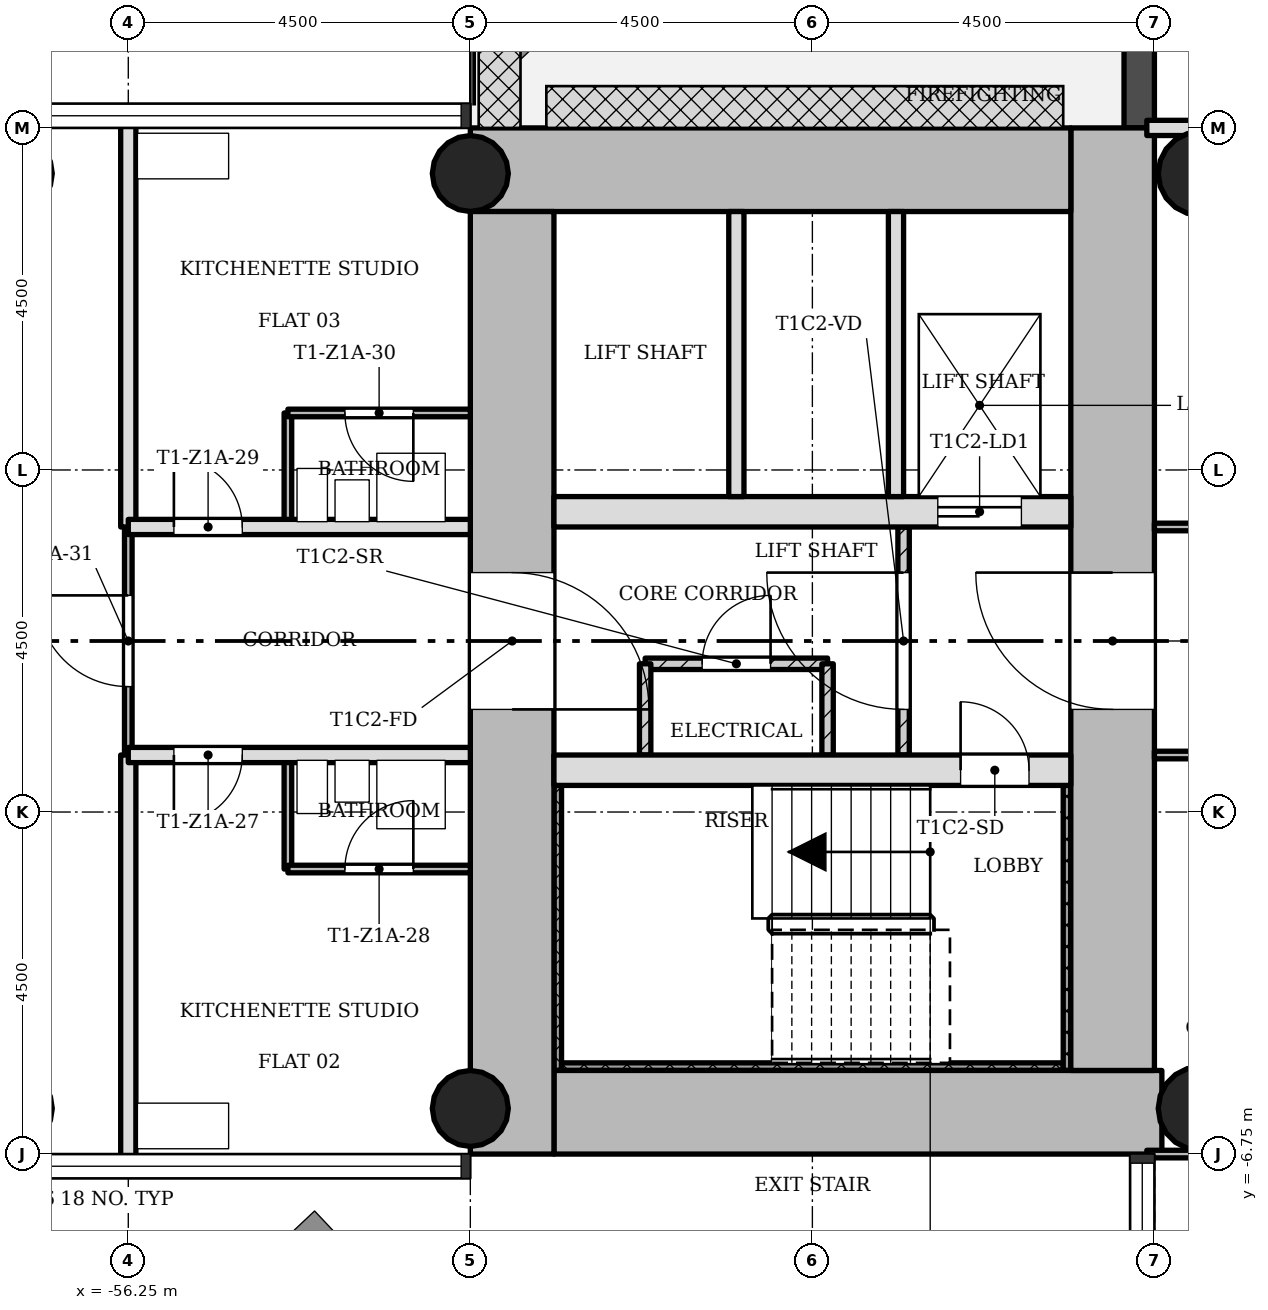
"""IFC4 building model, lengths in metres.
Left out: names, types, materials, properties, quantities, classifications, styles, units other than length and angle.
Written with IfcOpenShell. Run it as: python <this file> out.ifc"""

import sys

from ifc_helpers import new_model, si_unit, direction, frame, frame_2d, origin, origin_2d, place, context, subcontext, project, spatial, rectangle, hollow_circle, extrude, element, fill, save


model = new_model("IFC4")
c1 = context("Model", 3, precision=1e-05, world=origin(), true_north=direction((0.0, 1.0)))
c2 = subcontext(c1, "Body", "Model", "MODEL_VIEW")
j1 = project(units=[si_unit("LENGTHUNIT", "METRE"), si_unit("PLANEANGLEUNIT", "RADIAN")], contexts=[c1])
p1 = place(None, origin())
s1 = spatial("IfcSite", under=j1, at=p1, CompositionType="ELEMENT")
p2 = place(p1, origin())
s2 = spatial("IfcBuilding", under=s1, at=p2, CompositionType="ELEMENT")
p3 = place(p2, frame((0.0, 0.0, 31.3)))
s3 = spatial("IfcBuildingStorey", under=s2, at=p3, CompositionType="ELEMENT", Elevation=31.3)
p4 = place(p3, frame((-50.65, -6.2, 0.0), z_axis=(0.0, 0.0, 1.0), x_axis=(1.0, 0.0, 0.0)))
e1 = element("IfcWall", 1, at=p4, inside=s3, PredefinedType="SHEAR", context=c2, shape_type="SweptSolid", body=[
    extrude(rectangle(XDim=7.998, YDim=1.1, at=frame_2d((3.999, 0.0))), origin(), (0.0, 0.0, 1.0), 3.4),
])
p5 = place(p3, frame((-43.3, -5.65, 0.0), z_axis=(0.0, 0.0, 1.0), x_axis=(0.0, 1.0, 0.0)))
e2 = element("IfcWall", 2, at=p5, inside=s3, PredefinedType="SHEAR", context=c2, shape_type="SweptSolid", body=[
    extrude(rectangle(XDim=12.4, YDim=1.1, at=frame_2d((6.2, 0.0))), origin(), (0.0, 0.0, 1.0), 3.4),
])
p6 = place(p5, frame((4.75, 0.0, 0.0)))
e3 = element("IfcOpeningElement", 3, at=p6, cuts=e2, PredefinedType="OPENING", context=c2, shape_type="SweptSolid", body=[
    extrude(rectangle(XDim=1.8, YDim=2.1, at=frame_2d((0.9, 1.05))), frame((0.0, 0.56, 0.0), z_axis=(0.0, -1.0, 0.0), x_axis=(1.0, 0.0, 0.0)), (0.0, 0.0, 1.0), 1.12),
])
p7 = place(p3, frame((-43.85, 6.2, 0.0), z_axis=(0.0, 0.0, 1.0), x_axis=(-1.0, 0.0, 0.0)))
e4 = element("IfcWall", 4, at=p7, inside=s3, PredefinedType="SHEAR", context=c2, shape_type="SweptSolid", body=[
    extrude(rectangle(XDim=7.9, YDim=1.1, at=frame_2d((3.95, 0.0))), origin(), (0.0, 0.0, 1.0), 3.4),
])
p8 = place(p3, frame((-51.2, 5.65, 0.0), z_axis=(0.0, 0.0, 1.0), x_axis=(0.0, -1.0, 0.0)))
e5 = element("IfcWall", 5, at=p8, inside=s3, PredefinedType="SHEAR", context=c2, shape_type="SweptSolid", body=[
    extrude(rectangle(XDim=12.4, YDim=1.1, at=frame_2d((6.2, 0.0))), origin(), (0.0, 0.0, 1.0), 3.4),
])
p9 = place(p8, frame((4.75, 0.0, 0.0)))
e6 = element("IfcOpeningElement", 6, at=p9, cuts=e5, PredefinedType="OPENING", context=c2, shape_type="SweptSolid", body=[
    extrude(rectangle(XDim=1.8, YDim=2.1, at=frame_2d((0.9, 1.05))), frame((0.0, 0.56, 0.0), z_axis=(0.0, -1.0, 0.0), x_axis=(1.0, 0.0, 0.0)), (0.0, 0.0, 1.0), 1.12),
])
p10 = place(p3, frame((-50.65, -1.7, 0.0), z_axis=(0.0, 0.0, 1.0), x_axis=(1.0, 0.0, 0.0)))
e7 = element("IfcWall", 7, at=p10, inside=s3, PredefinedType="SHEAR", context=c2, shape_type="SweptSolid", body=[
    extrude(rectangle(XDim=6.8, YDim=0.4, at=frame_2d((3.4, 0.0))), origin(), (0.0, 0.0, 1.0), 3.4),
])
p11 = place(p10, frame((5.35, 0.0, 0.0)))
e8 = element("IfcOpeningElement", 8, at=p11, cuts=e7, PredefinedType="OPENING", context=c2, shape_type="SweptSolid", body=[
    extrude(rectangle(XDim=0.9, YDim=2.1, at=frame_2d((0.45, 1.05))), frame((0.0, 0.21, 0.0), z_axis=(0.0, -1.0, 0.0), x_axis=(1.0, 0.0, 0.0)), (0.0, 0.0, 1.0), 0.42),
])
p12 = place(p3, frame((-50.65, 1.7, 0.0), z_axis=(0.0, 0.0, 1.0), x_axis=(1.0, 0.0, 0.0)))
e9 = element("IfcWall", 9, at=p12, inside=s3, PredefinedType="SHEAR", context=c2, shape_type="SweptSolid", body=[
    extrude(rectangle(XDim=6.8, YDim=0.4, at=frame_2d((3.4, 0.0))), origin(), (0.0, 0.0, 1.0), 3.4),
])
p13 = place(p12, frame((5.05, 0.0, 0.0)))
e10 = element("IfcOpeningElement", 10, at=p13, cuts=e9, PredefinedType="OPENING", context=c2, shape_type="SweptSolid", body=[
    extrude(rectangle(XDim=1.1, YDim=2.1, at=frame_2d((0.55, 1.05))), frame((0.0, 0.21, 0.0), z_axis=(0.0, -1.0, 0.0), x_axis=(1.0, 0.0, 0.0)), (0.0, 0.0, 1.0), 0.42),
])
for number, where, z_axis, x_axis in (
    (11, (-51.75, -6.15, 0.0), (0.0, 0.0, 1.0), (1.0, 0.0, 0.0)),
    (12, (-51.75, 6.15, 0.0), (0.0, 0.0, 1.0), (1.0, 0.0, 0.0)),
):
    element("IfcColumn", number, at=place(p3, frame(where, z_axis=z_axis, x_axis=x_axis)), inside=s3, PredefinedType="COLUMN", context=c2, shape_type="SweptSolid", body=[
        extrude(hollow_circle(Radius=0.5, WallThickness=0.036, at=origin_2d()), origin(), (0.0, 0.0, 1.0), 3.4),
    ])
for number, where, z_axis, x_axis in (
    (13, (-42.15, -6.15, 0.0), (0.0, 0.0, 1.0), (1.0, 0.0, 0.0)),
    (14, (-42.15, 6.15, 0.0), (0.0, 0.0, 1.0), (1.0, 0.0, 0.0)),
):
    element("IfcColumn", number, at=place(p3, frame(where, z_axis=z_axis, x_axis=x_axis)), inside=s3, PredefinedType="COLUMN", context=c2, shape_type="SweptSolid", body=[
        extrude(hollow_circle(Radius=0.55, WallThickness=0.04, at=origin_2d()), origin(), (0.0, 0.0, 1.0), 3.4),
    ])
p14 = place(p3, frame((-42.95, 11.25, -0.02), z_axis=(0.0, 0.0, 1.0), x_axis=(0.0, -1.0, 0.0)))
e15 = element("IfcWall", 15, at=p14, inside=s3, PredefinedType="STANDARD", context=c2, shape_type="SweptSolid", body=[
    extrude(rectangle(XDim=4.5, YDim=0.4, at=frame_2d((2.25, 0.0))), origin(), (0.0, 0.0, 1.0), 3.12),
])
p15 = place(p14, frame((1.35, 0.0, 0.02)))
e16 = element("IfcOpeningElement", 16, at=p15, cuts=e15, PredefinedType="OPENING", context=c2, shape_type="SweptSolid", body=[
    extrude(rectangle(XDim=1.8, YDim=2.1, at=frame_2d((0.9, 1.05))), frame((0.0, 0.21, 0.0), z_axis=(0.0, -1.0, 0.0), x_axis=(1.0, 0.0, 0.0)), (0.0, 0.0, 1.0), 0.42),
])
p16 = place(p3, frame((-46.05, 1.5, 0.0), z_axis=(0.0, 0.0, 1.0), x_axis=(0.0, -1.0, 0.0)))
e17 = element("IfcWall", 17, at=p16, inside=s3, PredefinedType="PARTITIONING", context=c2, shape_type="SweptSolid", body=[
    extrude(rectangle(XDim=3.0, YDim=0.15, at=frame_2d((1.5, 0.0))), origin(), (0.0, 0.0, 1.0), 3.0),
])
p17 = place(p16, frame((0.6, 0.0, 0.0)))
e18 = element("IfcOpeningElement", 18, at=p17, cuts=e17, PredefinedType="OPENING", context=c2, shape_type="SweptSolid", body=[
    extrude(rectangle(XDim=1.8, YDim=2.1, at=frame_2d((0.9, 1.05))), frame((0.0, 0.085, 0.0), z_axis=(0.0, -1.0, 0.0), x_axis=(1.0, 0.0, 0.0)), (0.0, 0.0, 1.0), 0.17),
])
for number, where, z_axis, x_axis in (
    (19, (-46.15, 5.65, 0.0), (0.0, 0.0, 1.0), (0.0, -1.0, 0.0)),
    (20, (-48.25, 5.65, 0.0), (0.0, 0.0, 1.0), (0.0, -1.0, 0.0)),
):
    element("IfcWall", number, at=place(p3, frame(where, z_axis=z_axis, x_axis=x_axis)), inside=s3, PredefinedType="SOLIDWALL", context=c2, shape_type="SweptSolid", body=[
        extrude(rectangle(XDim=3.75, YDim=0.2, at=frame_2d((1.875, 0.0))), origin(), (0.0, 0.0, 1.0), 3.0),
    ])
p18 = place(p3, frame((-47.05, -0.3, 0.0), z_axis=(0.0, 0.0, 1.0), x_axis=(-1.0, 0.0, 0.0)))
e21 = element("IfcWall", 21, at=p18, inside=s3, PredefinedType="PARTITIONING", context=c2, shape_type="SweptSolid", body=[
    extrude(rectangle(XDim=2.4, YDim=0.15, at=frame_2d((1.2, 0.0))), origin(), (0.0, 0.0, 1.0), 3.0),
])
p19 = place(p18, frame((0.75, 0.0, 0.0)))
e22 = element("IfcOpeningElement", 22, at=p19, cuts=e21, PredefinedType="OPENING", context=c2, shape_type="SweptSolid", body=[
    extrude(rectangle(XDim=0.9, YDim=2.1, at=frame_2d((0.45, 1.05))), frame((0.0, 0.085, 0.0), z_axis=(0.0, -1.0, 0.0), x_axis=(1.0, 0.0, 0.0)), (0.0, 0.0, 1.0), 0.17),
])
for number, where, z_axis, x_axis in (
    (23, (-47.05, -0.3, 0.0), (0.0, 0.0, 1.0), (0.0, -1.0, 0.0)),
    (24, (-49.45, -0.3, 0.0), (0.0, 0.0, 1.0), (0.0, -1.0, 0.0)),
):
    element("IfcWall", number, at=place(p3, frame(where, z_axis=z_axis, x_axis=x_axis)), inside=s3, PredefinedType="PARTITIONING", context=c2, shape_type="SweptSolid", body=[
        extrude(rectangle(XDim=1.2, YDim=0.15, at=frame_2d((0.6, 0.0))), origin(), (0.0, 0.0, 1.0), 3.0),
    ])
p20 = place(p3, frame((-56.25, -1.5, 0.0), z_axis=(0.0, 0.0, 1.0), x_axis=(0.0, 1.0, 0.0)))
e25 = element("IfcWall", 25, at=p20, inside=s3, PredefinedType="PARTITIONING", context=c2, shape_type="SweptSolid", body=[
    extrude(rectangle(XDim=3.0, YDim=0.1, at=frame_2d((1.5, 0.0))), origin(), (0.0, 0.0, 1.0), 3.0),
])
p21 = place(p20, frame((0.9, 0.0, 0.0)))
e26 = element("IfcOpeningElement", 26, at=p21, cuts=e25, PredefinedType="OPENING", context=c2, shape_type="SweptSolid", body=[
    extrude(rectangle(XDim=1.2, YDim=2.1, at=frame_2d((0.6, 1.05))), frame((0.0, 0.06, 0.0), z_axis=(0.0, -1.0, 0.0), x_axis=(1.0, 0.0, 0.0)), (0.0, 0.0, 1.0), 0.12),
])
for number, where, z_axis, x_axis in (
    (27, (-56.25, -6.85, 0.0), (0.0, 0.0, 1.0), (0.0, 1.0, 0.0)),
    (28, (-56.25, 1.5, 0.0), (0.0, 0.0, 1.0), (0.0, 1.0, 0.0)),
):
    element("IfcWall", number, at=place(p3, frame(where, z_axis=z_axis, x_axis=x_axis)), inside=s3, PredefinedType="SOLIDWALL", context=c2, shape_type="SweptSolid", body=[
        extrude(rectangle(XDim=5.35, YDim=0.2, at=frame_2d((2.675, 0.0))), origin(), (0.0, 0.0, 1.0), 3.0),
    ])
for number, where, z_axis, x_axis in (
    (29, (-54.15, -3.0, 0.0), (0.0, 0.0, 1.0), (0.0, 1.0, 0.0)),
    (30, (-54.15, 1.5, 0.0), (0.0, 0.0, 1.0), (0.0, 1.0, 0.0)),
):
    element("IfcWall", number, at=place(p3, frame(where, z_axis=z_axis, x_axis=x_axis)), inside=s3, PredefinedType="PARTITIONING", context=c2, shape_type="SweptSolid", body=[
        extrude(rectangle(XDim=1.5, YDim=0.1, at=frame_2d((0.75, 0.0))), origin(), (0.0, 0.0, 1.0), 3.0),
    ])
p22 = place(p3, frame((-42.85, -6.75, 0.0), z_axis=(0.0, 0.0, 1.0), x_axis=(1.0, 0.0, 0.0)))
e31 = element("IfcWall", 31, at=p22, inside=s3, PredefinedType="PARTITIONING", context=c2, shape_type="SweptSolid", body=[
    extrude(rectangle(XDim=5.95, YDim=0.1, at=frame_2d((2.975, 0.0))), origin(), (0.0, 0.0, 1.0), 3.0),
])
p23 = place(p3, frame((-54.15, -3.0, 0.0), z_axis=(0.0, 0.0, 1.0), x_axis=(1.0, 0.0, 0.0)))
e32 = element("IfcWall", 32, at=p23, inside=s3, PredefinedType="PARTITIONING", context=c2, shape_type="SweptSolid", body=[
    extrude(rectangle(XDim=2.4, YDim=0.1, at=frame_2d((1.2, 0.0))), origin(), (0.0, 0.0, 1.0), 3.0),
])
p24 = place(p23, frame((0.75, 0.0, 0.0)))
e33 = element("IfcOpeningElement", 33, at=p24, cuts=e32, PredefinedType="OPENING", context=c2, shape_type="SweptSolid", body=[
    extrude(rectangle(XDim=0.9, YDim=2.1, at=frame_2d((0.45, 1.05))), frame((0.0, 0.06, 0.0), z_axis=(0.0, -1.0, 0.0), x_axis=(1.0, 0.0, 0.0)), (0.0, 0.0, 1.0), 0.12),
])
p25 = place(p3, frame((-42.75, -1.5, 0.0), z_axis=(0.0, 0.0, 1.0), x_axis=(1.0, 0.0, 0.0)))
e34 = element("IfcWall", 34, at=p25, inside=s3, PredefinedType="PARTITIONING", context=c2, shape_type="SweptSolid", body=[
    extrude(rectangle(XDim=5.85, YDim=0.1, at=frame_2d((2.925, 0.0))), origin(), (0.0, 0.0, 1.0), 3.0),
])
p26 = place(p25, frame((2.475, 0.0, 0.0)))
e35 = element("IfcOpeningElement", 35, at=p26, cuts=e34, PredefinedType="OPENING", context=c2, shape_type="SweptSolid", body=[
    extrude(rectangle(XDim=0.9, YDim=2.1, at=frame_2d((0.45, 1.05))), frame((0.0, 0.06, 0.0), z_axis=(0.0, -1.0, 0.0), x_axis=(1.0, 0.0, 0.0)), (0.0, 0.0, 1.0), 0.12),
])
p27 = place(p3, frame((-56.25, -1.5, 0.0), z_axis=(0.0, 0.0, 1.0), x_axis=(1.0, 0.0, 0.0)))
e36 = element("IfcWall", 36, at=p27, inside=s3, PredefinedType="SOLIDWALL", context=c2, shape_type="SweptSolid", body=[
    extrude(rectangle(XDim=4.5, YDim=0.2, at=frame_2d((2.25, 0.0))), origin(), (0.0, 0.0, 1.0), 3.0),
])
p28 = place(p27, frame((0.6, 0.0, 0.0)))
e37 = element("IfcOpeningElement", 37, at=p28, cuts=e36, PredefinedType="OPENING", context=c2, shape_type="SweptSolid", body=[
    extrude(rectangle(XDim=0.9, YDim=2.1, at=frame_2d((0.45, 1.05))), frame((0.0, 0.11, 0.0), z_axis=(0.0, -1.0, 0.0), x_axis=(1.0, 0.0, 0.0)), (0.0, 0.0, 1.0), 0.22),
])
p29 = place(p3, frame((-42.75, 1.5, 0.0), z_axis=(0.0, 0.0, 1.0), x_axis=(1.0, 0.0, 0.0)))
e38 = element("IfcWall", 38, at=p29, inside=s3, PredefinedType="PARTITIONING", context=c2, shape_type="SweptSolid", body=[
    extrude(rectangle(XDim=5.85, YDim=0.1, at=frame_2d((2.925, 0.0))), origin(), (0.0, 0.0, 1.0), 3.0),
])
p30 = place(p29, frame((2.475, 0.0, 0.0)))
e39 = element("IfcOpeningElement", 39, at=p30, cuts=e38, PredefinedType="OPENING", context=c2, shape_type="SweptSolid", body=[
    extrude(rectangle(XDim=0.9, YDim=2.1, at=frame_2d((0.45, 1.05))), frame((0.0, 0.06, 0.0), z_axis=(0.0, -1.0, 0.0), x_axis=(1.0, 0.0, 0.0)), (0.0, 0.0, 1.0), 0.12),
])
p31 = place(p3, frame((-56.25, 1.5, 0.0), z_axis=(0.0, 0.0, 1.0), x_axis=(1.0, 0.0, 0.0)))
e40 = element("IfcWall", 40, at=p31, inside=s3, PredefinedType="SOLIDWALL", context=c2, shape_type="SweptSolid", body=[
    extrude(rectangle(XDim=4.5, YDim=0.2, at=frame_2d((2.25, 0.0))), origin(), (0.0, 0.0, 1.0), 3.0),
])
p32 = place(p31, frame((0.6, 0.0, 0.0)))
e41 = element("IfcOpeningElement", 41, at=p32, cuts=e40, PredefinedType="OPENING", context=c2, shape_type="SweptSolid", body=[
    extrude(rectangle(XDim=0.9, YDim=2.1, at=frame_2d((0.45, 1.05))), frame((0.0, 0.11, 0.0), z_axis=(0.0, -1.0, 0.0), x_axis=(1.0, 0.0, 0.0)), (0.0, 0.0, 1.0), 0.22),
])
p33 = place(p3, frame((-54.15, 3.0, 0.0), z_axis=(0.0, 0.0, 1.0), x_axis=(1.0, 0.0, 0.0)))
e42 = element("IfcWall", 42, at=p33, inside=s3, PredefinedType="PARTITIONING", context=c2, shape_type="SweptSolid", body=[
    extrude(rectangle(XDim=2.4, YDim=0.1, at=frame_2d((1.2, 0.0))), origin(), (0.0, 0.0, 1.0), 3.0),
])
p34 = place(p33, frame((0.75, 0.0, 0.0)))
e43 = element("IfcOpeningElement", 43, at=p34, cuts=e42, PredefinedType="OPENING", context=c2, shape_type="SweptSolid", body=[
    extrude(rectangle(XDim=0.9, YDim=2.1, at=frame_2d((0.45, 1.05))), frame((0.0, 0.06, 0.0), z_axis=(0.0, -1.0, 0.0), x_axis=(1.0, 0.0, 0.0)), (0.0, 0.0, 1.0), 0.12),
])
p35 = place(p3, frame((-42.85, 6.75, 0.0), z_axis=(0.0, 0.0, 1.0), x_axis=(1.0, 0.0, 0.0)))
e44 = element("IfcWall", 44, at=p35, inside=s3, PredefinedType="SOLIDWALL", context=c2, shape_type="SweptSolid", body=[
    extrude(rectangle(XDim=13.7, YDim=0.2, at=frame_2d((6.85, 0.0))), origin(), (0.0, 0.0, 1.0), 3.0),
])
p36 = place(p35, frame((6.4, 0.0, 0.0)))
e45 = element("IfcOpeningElement", 45, at=p36, cuts=e44, PredefinedType="OPENING", context=c2, shape_type="SweptSolid", body=[
    extrude(rectangle(XDim=0.9, YDim=2.1, at=frame_2d((0.45, 1.05))), frame((0.0, 0.11, 0.0), z_axis=(0.0, -1.0, 0.0), x_axis=(1.0, 0.0, 0.0)), (0.0, 0.0, 1.0), 0.22),
])
p37 = place(p3, frame((-50.6, -1.9, 0.0), z_axis=(0.0, 0.0, 1.0), x_axis=(0.0, -1.0, 0.0)))
e46 = element("IfcWall", 46, at=p37, inside=s3, PredefinedType="SHEAR", context=c2, shape_type="SweptSolid", body=[
    extrude(rectangle(XDim=3.75, YDim=0.1, at=frame_2d((1.875, 0.0))), origin(), (0.0, 0.0, 1.0), 3.4),
])
p38 = place(p3, frame((-43.95, -5.6, 0.0), z_axis=(0.0, 0.0, 1.0), x_axis=(-1.0, 0.0, 0.0)))
e47 = element("IfcWall", 47, at=p38, inside=s3, PredefinedType="SHEAR", context=c2, shape_type="SweptSolid", body=[
    extrude(rectangle(XDim=6.6, YDim=0.1, at=frame_2d((3.3, 0.0))), origin(), (0.0, 0.0, 1.0), 3.4),
])
p39 = place(p3, frame((-43.9, -1.9, 0.0), z_axis=(0.0, 0.0, 1.0), x_axis=(0.0, -1.0, 0.0)))
e48 = element("IfcWall", 48, at=p39, inside=s3, PredefinedType="SHEAR", context=c2, shape_type="SweptSolid", body=[
    extrude(rectangle(XDim=3.75, YDim=0.1, at=frame_2d((1.875, 0.0))), origin(), (0.0, 0.0, 1.0), 3.4),
])
p40 = place(p17, origin())
e49 = element("IfcDoor", 49, at=p40, inside=s3, OperationType="SINGLE_SWING_LEFT", PredefinedType="DOOR", context=c2, shape_type="SweptSolid", body=[
    extrude(rectangle(XDim=1.8, YDim=2.1, at=frame_2d((0.9, 1.05))), frame((0.0, 0.025, 0.0), z_axis=(0.0, -1.0, 0.0), x_axis=(1.0, 0.0, 0.0)), (0.0, 0.0, 1.0), 0.05),
])
fill(e18, e49)
p41 = place(p19, origin())
e50 = element("IfcDoor", 50, at=p41, inside=s3, OperationType="SINGLE_SWING_LEFT", PredefinedType="DOOR", context=c2, shape_type="SweptSolid", body=[
    extrude(rectangle(XDim=0.9, YDim=2.1, at=frame_2d((0.45, 1.05))), frame((0.0, 0.025, 0.0), z_axis=(0.0, -1.0, 0.0), x_axis=(1.0, 0.0, 0.0)), (0.0, 0.0, 1.0), 0.05),
])
fill(e22, e50)
p42 = place(p28, origin())
e51 = element("IfcDoor", 51, at=p42, inside=s3, OperationType="SINGLE_SWING_LEFT", PredefinedType="DOOR", context=c2, shape_type="SweptSolid", body=[
    extrude(rectangle(XDim=0.9, YDim=2.1, at=frame_2d((0.45, 1.05))), frame((0.0, 0.025, 0.0), z_axis=(0.0, -1.0, 0.0), x_axis=(1.0, 0.0, 0.0)), (0.0, 0.0, 1.0), 0.05),
])
fill(e37, e51)
p43 = place(p24, origin())
e52 = element("IfcDoor", 52, at=p43, inside=s3, OperationType="SINGLE_SWING_LEFT", PredefinedType="DOOR", context=c2, shape_type="SweptSolid", body=[
    extrude(rectangle(XDim=0.9, YDim=2.1, at=frame_2d((0.45, 1.05))), frame((0.0, 0.025, 0.0), z_axis=(0.0, -1.0, 0.0), x_axis=(1.0, 0.0, 0.0)), (0.0, 0.0, 1.0), 0.05),
])
fill(e33, e52)
p44 = place(p32, origin())
e53 = element("IfcDoor", 53, at=p44, inside=s3, OperationType="SINGLE_SWING_RIGHT", PredefinedType="DOOR", context=c2, shape_type="SweptSolid", body=[
    extrude(rectangle(XDim=0.9, YDim=2.1, at=frame_2d((0.45, 1.05))), frame((0.0, 0.025, 0.0), z_axis=(0.0, -1.0, 0.0), x_axis=(1.0, 0.0, 0.0)), (0.0, 0.0, 1.0), 0.05),
])
fill(e41, e53)
p45 = place(p34, origin())
e54 = element("IfcDoor", 54, at=p45, inside=s3, OperationType="SINGLE_SWING_RIGHT", PredefinedType="DOOR", context=c2, shape_type="SweptSolid", body=[
    extrude(rectangle(XDim=0.9, YDim=2.1, at=frame_2d((0.45, 1.05))), frame((0.0, 0.025, 0.0), z_axis=(0.0, -1.0, 0.0), x_axis=(1.0, 0.0, 0.0)), (0.0, 0.0, 1.0), 0.05),
])
fill(e43, e54)
p46 = place(p21, origin())
e55 = element("IfcDoor", 55, at=p46, inside=s3, OperationType="SINGLE_SWING_LEFT", PredefinedType="DOOR", context=c2, shape_type="SweptSolid", body=[
    extrude(rectangle(XDim=1.2, YDim=2.1, at=frame_2d((0.6, 1.05))), frame((0.0, 0.025, 0.0), z_axis=(0.0, -1.0, 0.0), x_axis=(1.0, 0.0, 0.0)), (0.0, 0.0, 1.0), 0.05),
])
fill(e26, e55)
p47 = place(p11, origin())
e56 = element("IfcDoor", 56, at=p47, inside=s3, OperationType="SINGLE_SWING_RIGHT", PredefinedType="DOOR", context=c2, shape_type="SweptSolid", body=[
    extrude(rectangle(XDim=0.9, YDim=2.1, at=frame_2d((0.45, 1.05))), frame((0.0, 0.025, 0.0), z_axis=(0.0, -1.0, 0.0), x_axis=(1.0, 0.0, 0.0)), (0.0, 0.0, 1.0), 0.05),
])
fill(e8, e56)
p48 = place(p13, origin())
e57 = element("IfcDoor", 57, at=p48, inside=s3, OperationType="SLIDING_TO_LEFT", PredefinedType="DOOR", context=c2, shape_type="SweptSolid", body=[
    extrude(rectangle(XDim=1.1, YDim=2.1, at=frame_2d((0.55, 1.05))), frame((0.0, 0.025, 0.0), z_axis=(0.0, -1.0, 0.0), x_axis=(1.0, 0.0, 0.0)), (0.0, 0.0, 1.0), 0.05),
])
fill(e10, e57)
p49 = place(p6, origin())
e58 = element("IfcDoor", 58, at=p49, inside=s3, OperationType="SINGLE_SWING_LEFT", PredefinedType="DOOR", context=c2, shape_type="SweptSolid", body=[
    extrude(rectangle(XDim=1.8, YDim=2.1, at=frame_2d((0.9, 1.05))), frame((0.0, 0.025, 0.0), z_axis=(0.0, -1.0, 0.0), x_axis=(1.0, 0.0, 0.0)), (0.0, 0.0, 1.0), 0.05),
])
fill(e3, e58)
p50 = place(p9, origin())
e59 = element("IfcDoor", 59, at=p50, inside=s3, OperationType="SINGLE_SWING_LEFT", PredefinedType="DOOR", context=c2, shape_type="SweptSolid", body=[
    extrude(rectangle(XDim=1.8, YDim=2.1, at=frame_2d((0.9, 1.05))), frame((0.0, 0.025, 0.0), z_axis=(0.0, -1.0, 0.0), x_axis=(1.0, 0.0, 0.0)), (0.0, 0.0, 1.0), 0.05),
])
fill(e6, e59)
save(model, sys.argv[1])
